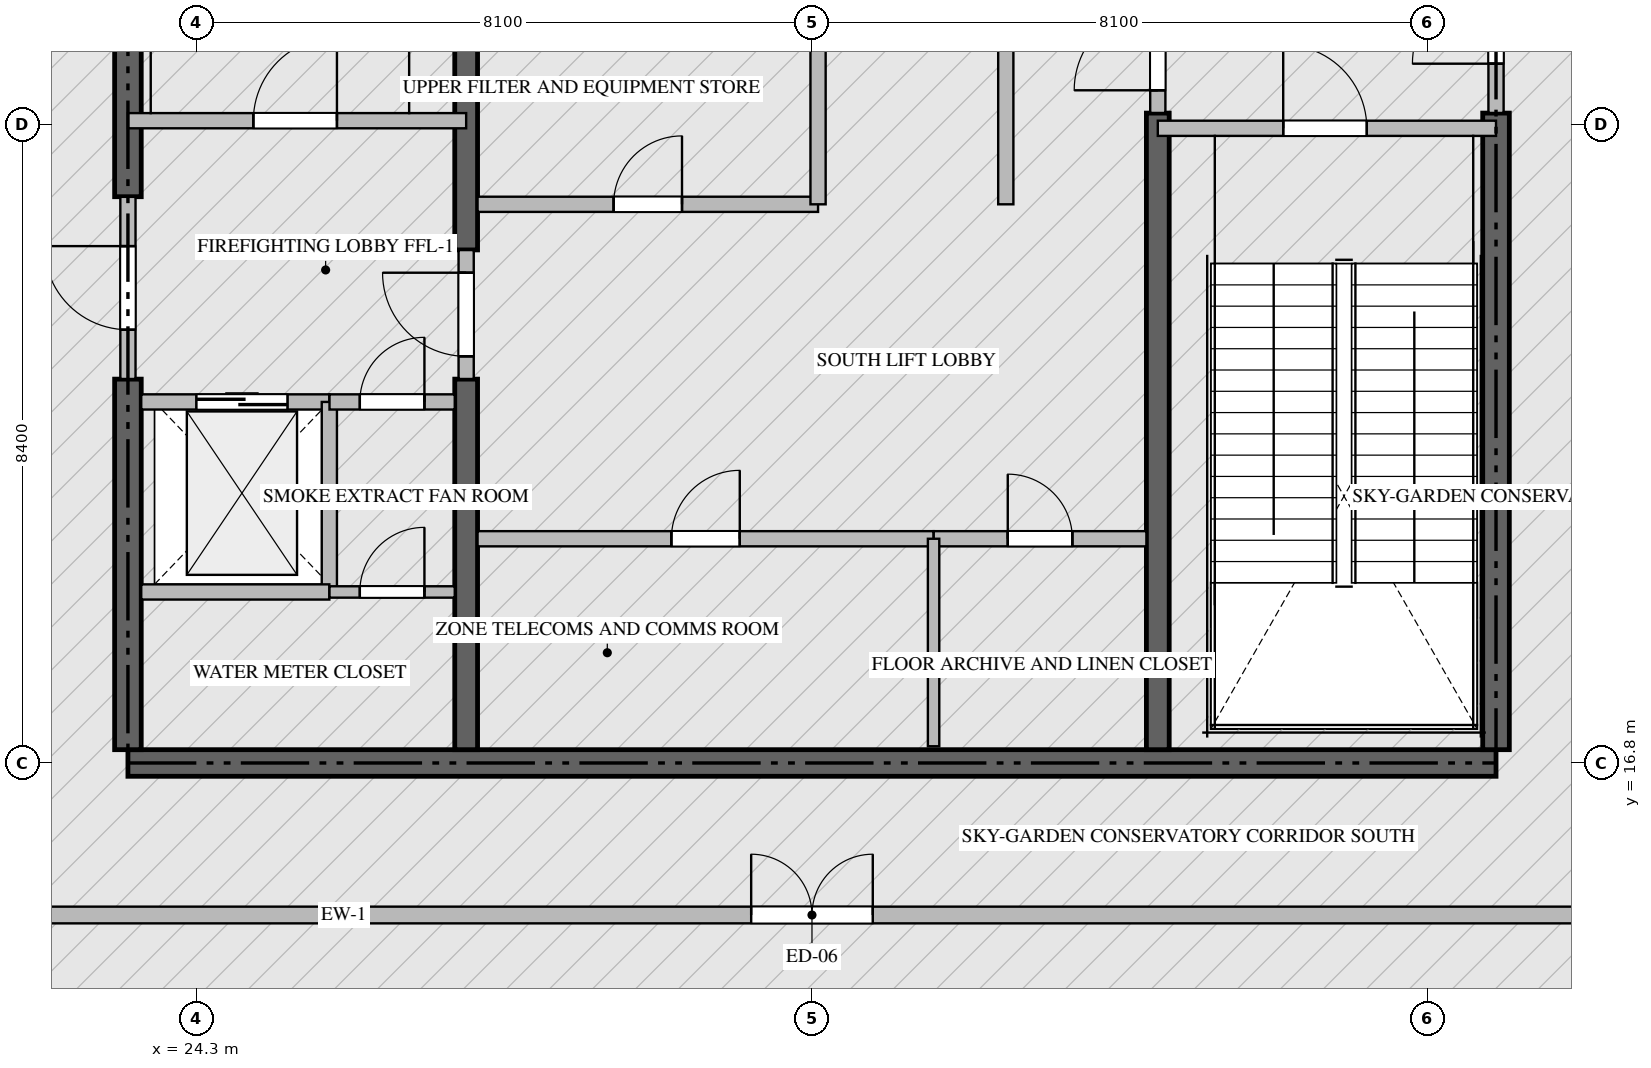
"""IFC4 building model, lengths in metres.
Left out: names, types, materials, properties, quantities, classifications, styles, units other than length and angle.
Written with IfcOpenShell. Run it as: python <this file> out.ifc"""

import sys

from ifc_helpers import new_model, si_unit, direction, frame, frame_2d, origin, place, context, subcontext, project, spatial, rectangle, extrude, source, transform, mapped, element, fill, save


model = new_model("IFC4")
c1 = context("Model", 3, precision=1e-05, world=origin(), true_north=direction((0.0, 1.0)))
c2 = subcontext(c1, "Body", "Model", "MODEL_VIEW")
j1 = project(units=[si_unit("LENGTHUNIT", "METRE"), si_unit("PLANEANGLEUNIT", "RADIAN")], contexts=[c1])
p1 = place(None, origin())
s1 = spatial("IfcSite", under=j1, at=p1, CompositionType="ELEMENT")
p2 = place(p1, origin())
s2 = spatial("IfcBuilding", under=s1, at=p2, CompositionType="ELEMENT")
p3 = place(p2, frame((0.0, 0.0, 359.75)))
s3 = spatial("IfcBuildingStorey", under=s2, at=p3, CompositionType="ELEMENT", Elevation=359.75)
p4 = place(p3, frame((23.4, 16.8, -0.36), z_axis=(0.0, 0.0, 1.0), x_axis=(1.0, 0.0, 0.0)))
e1 = element("IfcWall", 1, at=p4, inside=s3, PredefinedType="SHEAR", context=c2, shape_type="SweptSolid", body=[
    extrude(rectangle(XDim=18.0, YDim=0.35, at=frame_2d((9.0, 0.0))), origin(), (0.0, 0.0, 1.0), 5.998),
])
p5 = place(p3, frame((23.4, 16.975, -0.36), z_axis=(0.0, 0.0, 1.0), x_axis=(0.0, 1.0, 0.0)))
e2 = element("IfcWall", 2, at=p5, inside=s3, PredefinedType="SHEAR", context=c2, shape_type="SweptSolid", body=[
    extrude(rectangle(XDim=4.875, YDim=0.35, at=frame_2d((2.438, 0.0))), origin(), (0.0, 0.0, 1.0), 5.998),
])
p6 = place(p3, frame((23.4, 24.25, -0.36), z_axis=(0.0, 0.0, 1.0), x_axis=(0.0, 1.0, 0.0)))
e3 = element("IfcWall", 3, at=p6, inside=s3, PredefinedType="SHEAR", context=c2, shape_type="SweptSolid", body=[
    extrude(rectangle(XDim=9.175, YDim=0.35, at=frame_2d((4.587, 0.0))), origin(), (0.0, 0.0, 1.0), 5.998),
])
p7 = place(p3, frame((41.4, 16.975, -0.36), z_axis=(0.0, 0.0, 1.0), x_axis=(0.0, 1.0, 0.0)))
e4 = element("IfcWall", 4, at=p7, inside=s3, PredefinedType="SHEAR", context=c2, shape_type="SweptSolid", body=[
    extrude(rectangle(XDim=8.375, YDim=0.35, at=frame_2d((4.188, 0.0))), origin(), (0.0, 0.0, 1.0), 5.998),
])
p8 = place(p3, frame((27.85, 16.975, -0.36), z_axis=(0.0, 0.0, 1.0), x_axis=(0.0, 1.0, 0.0)))
e5 = element("IfcWall", 5, at=p8, inside=s3, PredefinedType="SHEAR", context=c2, shape_type="SweptSolid", body=[
    extrude(rectangle(XDim=4.875, YDim=0.3, at=frame_2d((2.438, 0.0))), origin(), (0.0, 0.0, 1.0), 5.998),
])
p9 = place(p3, frame((27.85, 23.55, -0.36), z_axis=(0.0, 0.0, 1.0), x_axis=(0.0, 1.0, 0.0)))
e6 = element("IfcWall", 6, at=p9, inside=s3, PredefinedType="SHEAR", context=c2, shape_type="SweptSolid", body=[
    extrude(rectangle(XDim=9.875, YDim=0.3, at=frame_2d((4.938, 0.0))), origin(), (0.0, 0.0, 1.0), 5.998),
])
p10 = place(p3, frame((36.95, 16.975, -0.36), z_axis=(0.0, 0.0, 1.0), x_axis=(0.0, 1.0, 0.0)))
e7 = element("IfcWall", 7, at=p10, inside=s3, PredefinedType="SHEAR", context=c2, shape_type="SweptSolid", body=[
    extrude(rectangle(XDim=8.375, YDim=0.3, at=frame_2d((4.188, 0.0))), origin(), (0.0, 0.0, 1.0), 5.998),
])
p11 = place(p3, frame((21.4, 14.8, 0.0), z_axis=(0.0, 0.0, 1.0), x_axis=(1.0, 0.0, 0.0)))
e8 = element("IfcWall", 8, at=p11, inside=s3, PredefinedType="ELEMENTEDWALL", context=c2, shape_type="SweptSolid", body=[
    extrude(rectangle(XDim=22.0, YDim=0.22, at=frame_2d((11.0, 0.0))), origin(), (0.0, 0.0, 1.0), 5.625),
])
p12 = place(p11, frame((10.2, 0.0, 0.0)))
e9 = element("IfcOpeningElement", 9, at=p12, cuts=e8, PredefinedType="OPENING", context=c2, shape_type="SweptSolid", body=[
    extrude(rectangle(XDim=1.6, YDim=2.3, at=frame_2d((0.8, 1.15))), frame((0.0, 0.12, 0.0), z_axis=(0.0, -1.0, 0.0), x_axis=(1.0, 0.0, 0.0)), (0.0, 0.0, 1.0), 0.24),
])
p13 = place(p3, frame((23.4, 25.25, 0.0), z_axis=(0.0, 0.0, 1.0), x_axis=(1.0, 0.0, 0.0)))
e10 = element("IfcWall", 10, at=p13, inside=s3, PredefinedType="STANDARD", context=c2, shape_type="SweptSolid", body=[
    extrude(rectangle(XDim=4.45, YDim=0.2, at=frame_2d((2.225, 0.0))), origin(), (0.0, 0.0, 1.0), 5.64),
])
p14 = place(p13, frame((1.65, 0.0, 0.0)))
e11 = element("IfcOpeningElement", 11, at=p14, cuts=e10, PredefinedType="OPENING", context=c2, shape_type="SweptSolid", body=[
    extrude(rectangle(XDim=1.1, YDim=2.15, at=frame_2d((0.55, 1.075))), frame((0.0, 0.11, 0.0), z_axis=(0.0, -1.0, 0.0), x_axis=(1.0, 0.0, 0.0)), (0.0, 0.0, 1.0), 0.22),
])
p15 = place(p3, frame((36.95, 25.15, 0.0), z_axis=(0.0, 0.0, 1.0), x_axis=(1.0, 0.0, 0.0)))
e12 = element("IfcWall", 12, at=p15, inside=s3, PredefinedType="STANDARD", context=c2, shape_type="SweptSolid", body=[
    extrude(rectangle(XDim=4.45, YDim=0.2, at=frame_2d((2.225, 0.0))), origin(), (0.0, 0.0, 1.0), 5.64),
])
p16 = place(p15, frame((1.65, 0.0, 0.0)))
e13 = element("IfcOpeningElement", 13, at=p16, cuts=e12, PredefinedType="OPENING", context=c2, shape_type="SweptSolid", body=[
    extrude(rectangle(XDim=1.1, YDim=2.15, at=frame_2d((0.55, 1.075))), frame((0.0, 0.11, 0.0), z_axis=(0.0, -1.0, 0.0), x_axis=(1.0, 0.0, 0.0)), (0.0, 0.0, 1.0), 0.22),
])
p17 = place(p3, frame((23.575, 21.55, 0.0), z_axis=(0.0, 0.0, 1.0), x_axis=(1.0, 0.0, 0.0)))
e14 = element("IfcWall", 14, at=p17, inside=s3, PredefinedType="STANDARD", context=c2, shape_type="SweptSolid", body=[
    extrude(rectangle(XDim=2.475, YDim=0.2, at=frame_2d((1.238, 0.0))), origin(), (0.0, 0.0, 1.0), 5.64),
])
p18 = place(p17, frame((0.725, 0.0, 0.0)))
e15 = element("IfcOpeningElement", 15, at=p18, cuts=e14, PredefinedType="OPENING", context=c2, shape_type="SweptSolid", body=[
    extrude(rectangle(XDim=1.2, YDim=2.2, at=frame_2d((0.6, 1.1))), frame((0.0, 0.11, 0.0), z_axis=(0.0, -1.0, 0.0), x_axis=(1.0, 0.0, 0.0)), (0.0, 0.0, 1.0), 0.22),
])
p19 = place(p3, frame((26.05, 19.05, 0.0), z_axis=(0.0, 0.0, 1.0), x_axis=(0.0, 1.0, 0.0)))
e16 = element("IfcWall", 16, at=p19, inside=s3, PredefinedType="STANDARD", context=c2, shape_type="SweptSolid", body=[
    extrude(rectangle(XDim=2.5, YDim=0.2, at=frame_2d((1.25, 0.0))), origin(), (0.0, 0.0, 1.0), 5.64),
])
p20 = place(p3, frame((23.575, 19.05, 0.0), z_axis=(0.0, 0.0, 1.0), x_axis=(1.0, 0.0, 0.0)))
e17 = element("IfcWall", 17, at=p20, inside=s3, PredefinedType="STANDARD", context=c2, shape_type="SweptSolid", body=[
    extrude(rectangle(XDim=2.475, YDim=0.2, at=frame_2d((1.238, 0.0))), origin(), (0.0, 0.0, 1.0), 5.64),
])
p21 = place(p3, frame((26.052, 21.55, 0.0), z_axis=(0.0, 0.0, 1.0), x_axis=(1.0, 0.0, 0.0)))
e18 = element("IfcWall", 18, at=p21, inside=s3, PredefinedType="STANDARD", context=c2, shape_type="SweptSolid", body=[
    extrude(rectangle(XDim=1.648, YDim=0.2, at=frame_2d((0.824, 0.0))), origin(), (0.0, 0.0, 1.0), 5.64),
])
p22 = place(p21, frame((0.399, 0.0, 0.0)))
e19 = element("IfcOpeningElement", 19, at=p22, cuts=e18, PredefinedType="OPENING", context=c2, shape_type="SweptSolid", body=[
    extrude(rectangle(XDim=0.85, YDim=2.1, at=frame_2d((0.425, 1.05))), frame((0.0, 0.11, 0.0), z_axis=(0.0, -1.0, 0.0), x_axis=(1.0, 0.0, 0.0)), (0.0, 0.0, 1.0), 0.22),
])
p23 = place(p3, frame((23.4, 21.852, 0.0), z_axis=(0.0, 0.0, 1.0), x_axis=(0.0, 1.0, 0.0)))
e20 = element("IfcWall", 20, at=p23, inside=s3, PredefinedType="STANDARD", context=c2, shape_type="SweptSolid", body=[
    extrude(rectangle(XDim=2.396, YDim=0.2, at=frame_2d((1.198, 0.0))), origin(), (0.0, 0.0, 1.0), 5.64),
])
p24 = place(p23, frame((0.648, 0.0, 0.0)))
e21 = element("IfcOpeningElement", 21, at=p24, cuts=e20, PredefinedType="OPENING", context=c2, shape_type="SweptSolid", body=[
    extrude(rectangle(XDim=1.1, YDim=2.15, at=frame_2d((0.55, 1.075))), frame((0.0, 0.11, 0.0), z_axis=(0.0, -1.0, 0.0), x_axis=(1.0, 0.0, 0.0)), (0.0, 0.0, 1.0), 0.22),
])
p25 = place(p3, frame((41.4, 25.352, 0.0), z_axis=(0.0, 0.0, 1.0), x_axis=(0.0, 1.0, 0.0)))
e22 = element("IfcWall", 22, at=p25, inside=s3, PredefinedType="STANDARD", context=c2, shape_type="SweptSolid", body=[
    extrude(rectangle(XDim=2.396, YDim=0.2, at=frame_2d((1.198, 0.0))), origin(), (0.0, 0.0, 1.0), 5.64),
])
p26 = place(p25, frame((0.648, 0.0, 0.0)))
e23 = element("IfcOpeningElement", 23, at=p26, cuts=e22, PredefinedType="OPENING", context=c2, shape_type="SweptSolid", body=[
    extrude(rectangle(XDim=1.1, YDim=2.15, at=frame_2d((0.55, 1.075))), frame((0.0, 0.11, 0.0), z_axis=(0.0, -1.0, 0.0), x_axis=(1.0, 0.0, 0.0)), (0.0, 0.0, 1.0), 0.22),
])
p27 = place(p3, frame((27.85, 21.852, 0.0), z_axis=(0.0, 0.0, 1.0), x_axis=(0.0, 1.0, 0.0)))
e24 = element("IfcWall", 24, at=p27, inside=s3, PredefinedType="STANDARD", context=c2, shape_type="SweptSolid", body=[
    extrude(rectangle(XDim=1.696, YDim=0.2, at=frame_2d((0.848, 0.0))), origin(), (0.0, 0.0, 1.0), 5.64),
])
p28 = place(p27, frame((0.298, 0.0, 0.0)))
e25 = element("IfcOpeningElement", 25, at=p28, cuts=e24, PredefinedType="OPENING", context=c2, shape_type="SweptSolid", body=[
    extrude(rectangle(XDim=1.1, YDim=2.15, at=frame_2d((0.55, 1.075))), frame((0.0, 0.11, 0.0), z_axis=(0.0, -1.0, 0.0), x_axis=(1.0, 0.0, 0.0)), (0.0, 0.0, 1.0), 0.22),
])
p29 = place(p3, frame((36.95, 25.352, 0.0), z_axis=(0.0, 0.0, 1.0), x_axis=(0.0, 1.0, 0.0)))
e26 = element("IfcWall", 26, at=p29, inside=s3, PredefinedType="STANDARD", context=c2, shape_type="SweptSolid", body=[
    extrude(rectangle(XDim=1.696, YDim=0.2, at=frame_2d((0.848, 0.0))), origin(), (0.0, 0.0, 1.0), 5.64),
])
p30 = place(p29, frame((0.298, 0.0, 0.0)))
e27 = element("IfcOpeningElement", 27, at=p30, cuts=e26, PredefinedType="OPENING", context=c2, shape_type="SweptSolid", body=[
    extrude(rectangle(XDim=1.1, YDim=2.15, at=frame_2d((0.55, 1.075))), frame((0.0, 0.11, 0.0), z_axis=(0.0, -1.0, 0.0), x_axis=(1.0, 0.0, 0.0)), (0.0, 0.0, 1.0), 0.22),
])
p31 = place(p3, frame((26.052, 19.05, 0.0), z_axis=(0.0, 0.0, 1.0), x_axis=(1.0, 0.0, 0.0)))
e28 = element("IfcWall", 28, at=p31, inside=s3, PredefinedType="PARTITIONING", context=c2, shape_type="SweptSolid", body=[
    extrude(rectangle(XDim=1.648, YDim=0.15, at=frame_2d((0.824, 0.0))), origin(), (0.0, 0.0, 1.0), 5.64),
])
p32 = place(p31, frame((0.399, 0.0, 0.0)))
e29 = element("IfcOpeningElement", 29, at=p32, cuts=e28, PredefinedType="OPENING", context=c2, shape_type="SweptSolid", body=[
    extrude(rectangle(XDim=0.85, YDim=2.1, at=frame_2d((0.425, 1.05))), frame((0.0, 0.085, 0.0), z_axis=(0.0, -1.0, 0.0), x_axis=(1.0, 0.0, 0.0)), (0.0, 0.0, 1.0), 0.17),
])
p33 = place(p3, frame((28.0, 19.75, 0.0), z_axis=(0.0, 0.0, 1.0), x_axis=(1.0, 0.0, 0.0)))
e30 = element("IfcWall", 30, at=p33, inside=s3, PredefinedType="STANDARD", context=c2, shape_type="SweptSolid", body=[
    extrude(rectangle(XDim=6.0, YDim=0.2, at=frame_2d((3.0, 0.0))), origin(), (0.0, 0.0, 1.0), 5.64),
])
p34 = place(p33, frame((2.55, 0.0, 0.0)))
e31 = element("IfcOpeningElement", 31, at=p34, cuts=e30, PredefinedType="OPENING", context=c2, shape_type="SweptSolid", body=[
    extrude(rectangle(XDim=0.9, YDim=2.1, at=frame_2d((0.45, 1.05))), frame((0.0, 0.11, 0.0), z_axis=(0.0, -1.0, 0.0), x_axis=(1.0, 0.0, 0.0)), (0.0, 0.0, 1.0), 0.22),
])
p35 = place(p3, frame((34.002, 19.75, 0.0), z_axis=(0.0, 0.0, 1.0), x_axis=(1.0, 0.0, 0.0)))
e32 = element("IfcWall", 32, at=p35, inside=s3, PredefinedType="STANDARD", context=c2, shape_type="SweptSolid", body=[
    extrude(rectangle(XDim=2.798, YDim=0.2, at=frame_2d((1.399, 0.0))), origin(), (0.0, 0.0, 1.0), 5.64),
])
p36 = place(p35, frame((0.974, 0.0, 0.0)))
e33 = element("IfcOpeningElement", 33, at=p36, cuts=e32, PredefinedType="OPENING", context=c2, shape_type="SweptSolid", body=[
    extrude(rectangle(XDim=0.85, YDim=2.1, at=frame_2d((0.425, 1.05))), frame((0.0, 0.11, 0.0), z_axis=(0.0, -1.0, 0.0), x_axis=(1.0, 0.0, 0.0)), (0.0, 0.0, 1.0), 0.22),
])
p37 = place(p3, frame((34.0, 17.02, 0.0), z_axis=(0.0, 0.0, 1.0), x_axis=(0.0, 1.0, 0.0)))
e34 = element("IfcWall", 34, at=p37, inside=s3, PredefinedType="PARTITIONING", context=c2, shape_type="SweptSolid", body=[
    extrude(rectangle(XDim=2.73, YDim=0.15, at=frame_2d((1.365, 0.0))), origin(), (0.0, 0.0, 1.0), 5.64),
])
p38 = place(p3, frame((34.95, 24.15, 0.0), z_axis=(0.0, 0.0, 1.0), x_axis=(0.0, 1.0, 0.0)))
e35 = element("IfcWall", 35, at=p38, inside=s3, PredefinedType="STANDARD", context=c2, shape_type="SweptSolid", body=[
    extrude(rectangle(XDim=2.8, YDim=0.2, at=frame_2d((1.4, 0.0))), origin(), (0.0, 0.0, 1.0), 5.64),
])
p39 = place(p3, frame((28.0, 24.15, 0.0), z_axis=(0.0, 0.0, 1.0), x_axis=(1.0, 0.0, 0.0)))
e36 = element("IfcWall", 36, at=p39, inside=s3, PredefinedType="STANDARD", context=c2, shape_type="SweptSolid", body=[
    extrude(rectangle(XDim=4.48, YDim=0.2, at=frame_2d((2.24, 0.0))), origin(), (0.0, 0.0, 1.0), 5.64),
])
p40 = place(p39, frame((1.79, 0.0, 0.0)))
e37 = element("IfcOpeningElement", 37, at=p40, cuts=e36, PredefinedType="OPENING", context=c2, shape_type="SweptSolid", body=[
    extrude(rectangle(XDim=0.9, YDim=2.1, at=frame_2d((0.45, 1.05))), frame((0.0, 0.11, 0.0), z_axis=(0.0, -1.0, 0.0), x_axis=(1.0, 0.0, 0.0)), (0.0, 0.0, 1.0), 0.22),
])
p41 = place(p3, frame((32.48, 24.15, 0.0), z_axis=(0.0, 0.0, 1.0), x_axis=(0.0, 1.0, 0.0)))
e38 = element("IfcWall", 38, at=p41, inside=s3, PredefinedType="STANDARD", context=c2, shape_type="SweptSolid", body=[
    extrude(rectangle(XDim=2.8, YDim=0.2, at=frame_2d((1.4, 0.0))), origin(), (0.0, 0.0, 1.0), 5.64),
])
m1 = source(origin(), c2, "Body", "SweptSolid", [
    extrude(rectangle(XDim=1.6, YDim=2.3, at=frame_2d((0.8, 1.15))), frame((0.0, 0.025, 0.0), z_axis=(0.0, -1.0, 0.0), x_axis=(1.0, 0.0, 0.0)), (0.0, 0.0, 1.0), 0.05),
])
p42 = place(p12, origin())
e39 = element("IfcDoor", 39, at=p42, inside=s3, OperationType="DOUBLE_DOOR_SINGLE_SWING", PredefinedType="DOOR", context=c2, shape_type="MappedRepresentation", body=[
    mapped(m1, transform((0.0, 0.0, 0.0), scale=1.0)),
])
fill(e9, e39)
m2 = source(origin(), c2, "Body", "SweptSolid", [
    extrude(rectangle(XDim=1.1, YDim=2.15, at=frame_2d((0.55, 1.075))), frame((0.0, 0.025, 0.0), z_axis=(0.0, -1.0, 0.0), x_axis=(1.0, 0.0, 0.0)), (0.0, 0.0, 1.0), 0.05),
])
p43 = place(p14, origin())
e40 = element("IfcDoor", 40, at=p43, inside=s3, OperationType="SINGLE_SWING_RIGHT", PredefinedType="DOOR", context=c2, shape_type="MappedRepresentation", body=[
    mapped(m2, transform((0.0, 0.0, 0.0), scale=1.0)),
])
fill(e11, e40)
p44 = place(p16, origin())
e41 = element("IfcDoor", 41, at=p44, inside=s3, OperationType="SINGLE_SWING_LEFT", PredefinedType="DOOR", context=c2, shape_type="MappedRepresentation", body=[
    mapped(m2, transform((0.0, 0.0, 0.0), scale=1.0)),
])
fill(e13, e41)
m3 = source(origin(), c2, "Body", "SweptSolid", [
    extrude(rectangle(XDim=1.2, YDim=2.2, at=frame_2d((0.6, 1.1))), frame((0.0, 0.025, 0.0), z_axis=(0.0, -1.0, 0.0), x_axis=(1.0, 0.0, 0.0)), (0.0, 0.0, 1.0), 0.05),
])
p45 = place(p18, origin())
e42 = element("IfcDoor", 42, at=p45, inside=s3, OperationType="DOUBLE_DOOR_SLIDING", PredefinedType="DOOR", context=c2, shape_type="MappedRepresentation", body=[
    mapped(m3, transform((0.0, 0.0, 0.0), scale=1.0)),
])
fill(e15, e42)
m4 = source(origin(), c2, "Body", "SweptSolid", [
    extrude(rectangle(XDim=0.85, YDim=2.1, at=frame_2d((0.425, 1.05))), frame((0.0, 0.025, 0.0), z_axis=(0.0, -1.0, 0.0), x_axis=(1.0, 0.0, 0.0)), (0.0, 0.0, 1.0), 0.05),
])
p46 = place(p22, origin())
e43 = element("IfcDoor", 43, at=p46, inside=s3, OperationType="SINGLE_SWING_RIGHT", PredefinedType="DOOR", context=c2, shape_type="MappedRepresentation", body=[
    mapped(m4, transform((0.0, 0.0, 0.0), scale=1.0)),
])
fill(e19, e43)
p47 = place(p24, origin())
e44 = element("IfcDoor", 44, at=p47, inside=s3, OperationType="SINGLE_SWING_RIGHT", PredefinedType="DOOR", context=c2, shape_type="MappedRepresentation", body=[
    mapped(m2, transform((0.0, 0.0, 0.0), scale=1.0)),
])
fill(e21, e44)
p48 = place(p26, origin())
e45 = element("IfcDoor", 45, at=p48, inside=s3, OperationType="SINGLE_SWING_LEFT", PredefinedType="DOOR", context=c2, shape_type="MappedRepresentation", body=[
    mapped(m2, transform((0.0, 0.0, 0.0), scale=1.0)),
])
fill(e23, e45)
p49 = place(p28, origin())
e46 = element("IfcDoor", 46, at=p49, inside=s3, OperationType="SINGLE_SWING_RIGHT", PredefinedType="DOOR", context=c2, shape_type="MappedRepresentation", body=[
    mapped(m2, transform((0.0, 0.0, 0.0), scale=1.0)),
])
fill(e25, e46)
p50 = place(p30, origin())
e47 = element("IfcDoor", 47, at=p50, inside=s3, OperationType="SINGLE_SWING_LEFT", PredefinedType="DOOR", context=c2, shape_type="MappedRepresentation", body=[
    mapped(m2, transform((0.0, 0.0, 0.0), scale=1.0)),
])
fill(e27, e47)
p51 = place(p32, origin())
e48 = element("IfcDoor", 48, at=p51, inside=s3, OperationType="SINGLE_SWING_RIGHT", PredefinedType="DOOR", context=c2, shape_type="MappedRepresentation", body=[
    mapped(m4, transform((0.0, 0.0, 0.0), scale=1.0)),
])
fill(e29, e48)
m5 = source(origin(), c2, "Body", "SweptSolid", [
    extrude(rectangle(XDim=0.9, YDim=2.1, at=frame_2d((0.45, 1.05))), frame((0.0, 0.025, 0.0), z_axis=(0.0, -1.0, 0.0), x_axis=(1.0, 0.0, 0.0)), (0.0, 0.0, 1.0), 0.05),
])
p52 = place(p34, origin())
e49 = element("IfcDoor", 49, at=p52, inside=s3, OperationType="SINGLE_SWING_RIGHT", PredefinedType="DOOR", context=c2, shape_type="MappedRepresentation", body=[
    mapped(m5, transform((0.0, 0.0, 0.0), scale=1.0)),
])
fill(e31, e49)
p53 = place(p36, origin())
e50 = element("IfcDoor", 50, at=p53, inside=s3, OperationType="SINGLE_SWING_LEFT", PredefinedType="DOOR", context=c2, shape_type="MappedRepresentation", body=[
    mapped(m4, transform((0.0, 0.0, 0.0), scale=1.0)),
])
fill(e33, e50)
p54 = place(p40, origin())
e51 = element("IfcDoor", 51, at=p54, inside=s3, OperationType="SINGLE_SWING_RIGHT", PredefinedType="DOOR", context=c2, shape_type="MappedRepresentation", body=[
    mapped(m5, transform((0.0, 0.0, 0.0), scale=1.0)),
])
fill(e37, e51)
save(model, sys.argv[1])
